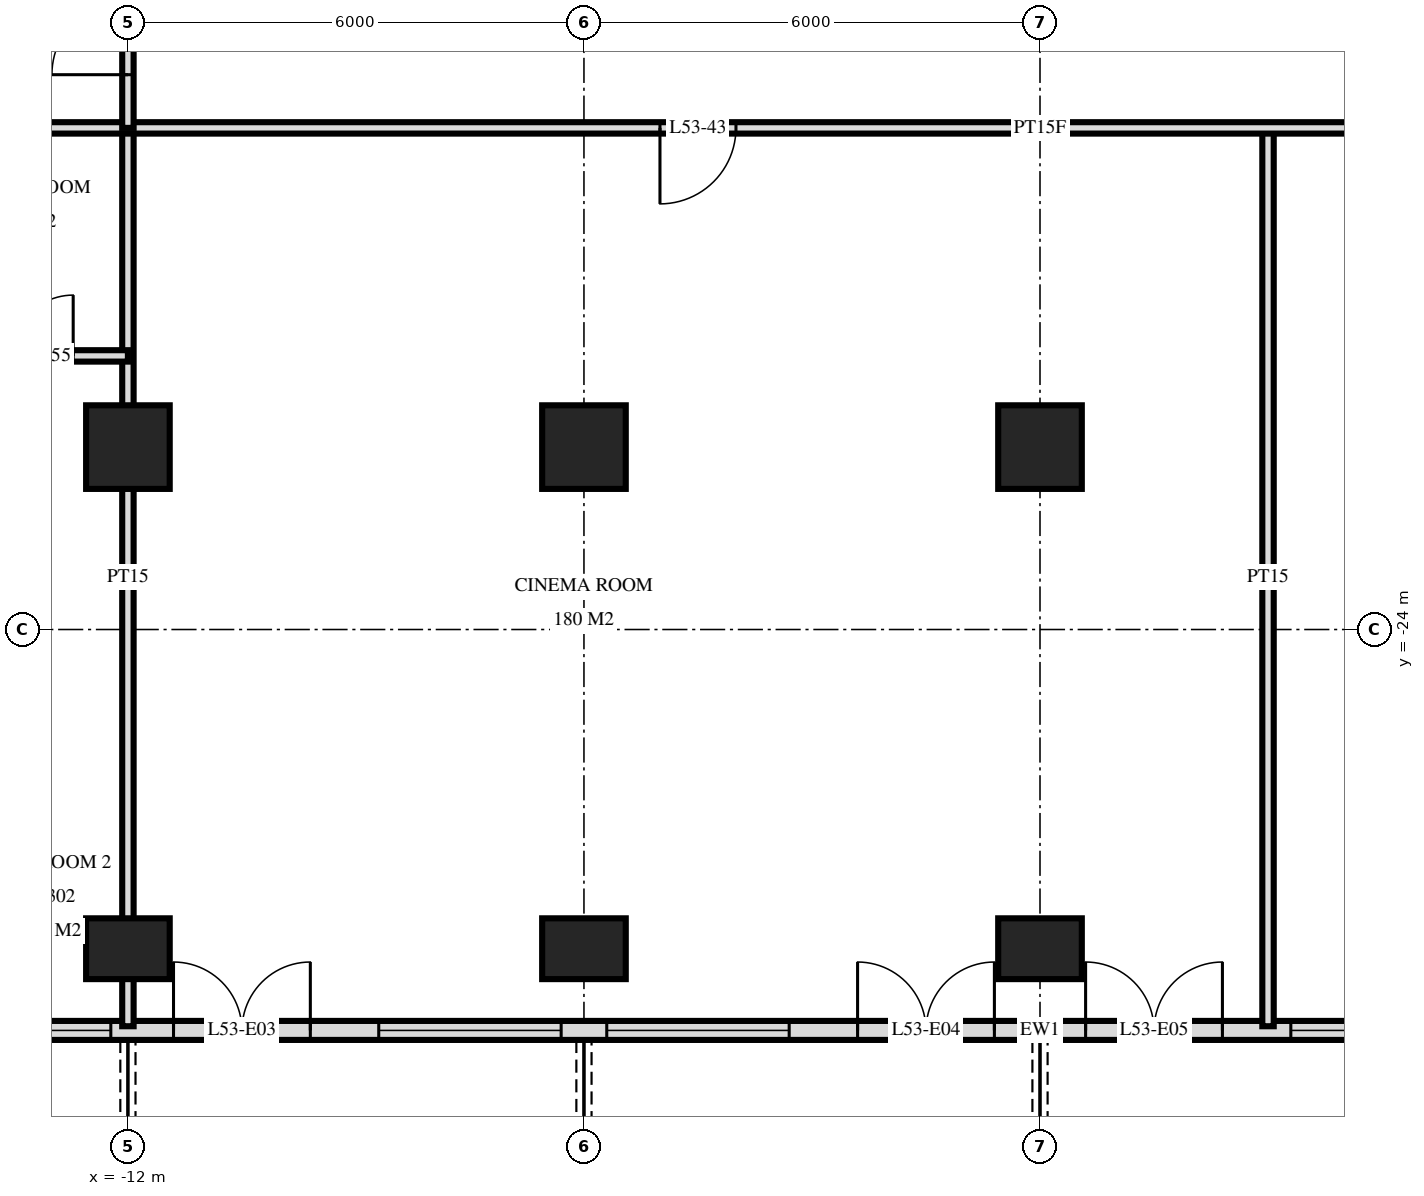
"""IFC4 building model, lengths in metres.
Left out: names, types, materials, properties, quantities, classifications, styles, units other than length and angle.
Written with IfcOpenShell. Run it as: python <this file> out.ifc"""

import sys

from ifc_helpers import new_model, si_unit, direction, frame, frame_2d, origin, origin_2d, place, context, subcontext, project, spatial, rectangle, extrude, element, fill, save


model = new_model("IFC4")
c1 = context("Model", 3, precision=1e-05, world=origin(), true_north=direction((0.0, 1.0)))
c2 = subcontext(c1, "Body", "Model", "MODEL_VIEW")
j1 = project(units=[si_unit("LENGTHUNIT", "METRE"), si_unit("PLANEANGLEUNIT", "RADIAN")], contexts=[c1])
p1 = place(None, origin())
s1 = spatial("IfcSite", under=j1, at=p1, CompositionType="ELEMENT")
p2 = place(p1, origin())
s2 = spatial("IfcBuilding", under=s1, at=p2, CompositionType="ELEMENT")
p3 = place(p2, frame((0.0, 0.0, 204.6)))
s3 = spatial("IfcBuildingStorey", under=s2, at=p3, CompositionType="ELEMENT", Elevation=204.6)
p4 = place(p3, frame((-12.0, -28.2, 0.0), z_axis=(0.0, 0.0, 1.0), x_axis=(1.0, 0.0, 0.0)))
e1 = element("IfcColumn", 1, at=p4, inside=s3, PredefinedType="COLUMN", context=c2, shape_type="SweptSolid", body=[
    extrude(rectangle(XDim=1.1, YDim=0.8, at=origin_2d()), origin(), (0.0, 0.0, 1.0), 3.5),
])
p5 = place(p3, frame((-12.0, -21.6, 0.0), z_axis=(0.0, 0.0, 1.0), x_axis=(1.0, 0.0, 0.0)))
e2 = element("IfcColumn", 2, at=p5, inside=s3, PredefinedType="COLUMN", context=c2, shape_type="SweptSolid", body=[
    extrude(rectangle(XDim=1.1, YDim=1.1, at=origin_2d()), origin(), (0.0, 0.0, 1.0), 3.5),
])
p6 = place(p3, frame((-6.0, -28.2, 0.0), z_axis=(0.0, 0.0, 1.0), x_axis=(1.0, 0.0, 0.0)))
e3 = element("IfcColumn", 3, at=p6, inside=s3, PredefinedType="COLUMN", context=c2, shape_type="SweptSolid", body=[
    extrude(rectangle(XDim=1.1, YDim=0.8, at=origin_2d()), origin(), (0.0, 0.0, 1.0), 3.5),
])
p7 = place(p3, frame((-6.0, -21.6, 0.0), z_axis=(0.0, 0.0, 1.0), x_axis=(1.0, 0.0, 0.0)))
e4 = element("IfcColumn", 4, at=p7, inside=s3, PredefinedType="COLUMN", context=c2, shape_type="SweptSolid", body=[
    extrude(rectangle(XDim=1.1, YDim=1.1, at=origin_2d()), origin(), (0.0, 0.0, 1.0), 3.5),
])
p8 = place(p3, frame((0.0, -28.2, 0.0), z_axis=(0.0, 0.0, 1.0), x_axis=(1.0, 0.0, 0.0)))
e5 = element("IfcColumn", 5, at=p8, inside=s3, PredefinedType="COLUMN", context=c2, shape_type="SweptSolid", body=[
    extrude(rectangle(XDim=1.1, YDim=0.8, at=origin_2d()), origin(), (0.0, 0.0, 1.0), 3.5),
])
p9 = place(p3, frame((0.0, -21.6, 0.0), z_axis=(0.0, 0.0, 1.0), x_axis=(1.0, 0.0, 0.0)))
e6 = element("IfcColumn", 6, at=p9, inside=s3, PredefinedType="COLUMN", context=c2, shape_type="SweptSolid", body=[
    extrude(rectangle(XDim=1.1, YDim=1.1, at=origin_2d()), origin(), (0.0, 0.0, 1.0), 3.5),
])
p10 = place(p3, frame((-22.475, -29.275, 0.0), z_axis=(0.0, 0.0, 1.0), x_axis=(1.0, 0.0, 0.0)))
e7 = element("IfcWall", 7, at=p10, inside=s3, PredefinedType="SOLIDWALL", context=c2, shape_type="SweptSolid", body=[
    extrude(rectangle(XDim=44.951, YDim=0.25, at=frame_2d((22.475, 0.0))), origin(), (0.0, 0.0, 1.0), 3.22),
])
p11 = place(p10, frame((0.575, 0.0, 0.0)))
e8 = element("IfcOpeningElement", 8, at=p11, cuts=e7, PredefinedType="OPENING", context=c2, shape_type="SweptSolid", body=[
    extrude(rectangle(XDim=1.8, YDim=2.4, at=frame_2d((0.9, 1.2))), frame((0.0, 0.135, 0.0), z_axis=(0.0, -1.0, 0.0), x_axis=(1.0, 0.0, 0.0)), (0.0, 0.0, 1.0), 0.27),
])
p12 = place(p10, frame((6.2, 0.0, 0.0)))
e9 = element("IfcOpeningElement", 9, at=p12, cuts=e7, PredefinedType="OPENING", context=c2, shape_type="SweptSolid", body=[
    extrude(rectangle(XDim=1.8, YDim=2.4, at=frame_2d((0.9, 1.2))), frame((0.0, 0.135, 0.0), z_axis=(0.0, -1.0, 0.0), x_axis=(1.0, 0.0, 0.0)), (0.0, 0.0, 1.0), 0.27),
])
p13 = place(p10, frame((8.45, 0.0, 0.9)))
e10 = element("IfcOpeningElement", 10, at=p13, cuts=e7, PredefinedType="OPENING", context=c2, shape_type="SweptSolid", body=[
    extrude(rectangle(XDim=1.8, YDim=1.5, at=frame_2d((0.9, 0.75))), frame((0.0, 0.135, 0.0), z_axis=(0.0, -1.0, 0.0), x_axis=(1.0, 0.0, 0.0)), (0.0, 0.0, 1.0), 0.27),
])
p14 = place(p10, frame((11.075, 0.0, 0.0)))
e11 = element("IfcOpeningElement", 11, at=p14, cuts=e7, PredefinedType="OPENING", context=c2, shape_type="SweptSolid", body=[
    extrude(rectangle(XDim=1.8, YDim=2.4, at=frame_2d((0.9, 1.2))), frame((0.0, 0.135, 0.0), z_axis=(0.0, -1.0, 0.0), x_axis=(1.0, 0.0, 0.0)), (0.0, 0.0, 1.0), 0.27),
])
p15 = place(p10, frame((13.775, 0.0, 0.9)))
e12 = element("IfcOpeningElement", 12, at=p15, cuts=e7, PredefinedType="OPENING", context=c2, shape_type="SweptSolid", body=[
    extrude(rectangle(XDim=2.4, YDim=1.5, at=frame_2d((1.2, 0.75))), frame((0.0, 0.135, 0.0), z_axis=(0.0, -1.0, 0.0), x_axis=(1.0, 0.0, 0.0)), (0.0, 0.0, 1.0), 0.27),
])
p16 = place(p10, frame((16.775, 0.0, 0.9)))
e13 = element("IfcOpeningElement", 13, at=p16, cuts=e7, PredefinedType="OPENING", context=c2, shape_type="SweptSolid", body=[
    extrude(rectangle(XDim=2.4, YDim=1.5, at=frame_2d((1.2, 0.75))), frame((0.0, 0.135, 0.0), z_axis=(0.0, -1.0, 0.0), x_axis=(1.0, 0.0, 0.0)), (0.0, 0.0, 1.0), 0.27),
])
p17 = place(p10, frame((20.075, 0.0, 0.0)))
e14 = element("IfcOpeningElement", 14, at=p17, cuts=e7, PredefinedType="OPENING", context=c2, shape_type="SweptSolid", body=[
    extrude(rectangle(XDim=1.8, YDim=2.4, at=frame_2d((0.9, 1.2))), frame((0.0, 0.135, 0.0), z_axis=(0.0, -1.0, 0.0), x_axis=(1.0, 0.0, 0.0)), (0.0, 0.0, 1.0), 0.27),
])
p18 = place(p10, frame((23.075, 0.0, 0.0)))
e15 = element("IfcOpeningElement", 15, at=p18, cuts=e7, PredefinedType="OPENING", context=c2, shape_type="SweptSolid", body=[
    extrude(rectangle(XDim=1.8, YDim=2.4, at=frame_2d((0.9, 1.2))), frame((0.0, 0.135, 0.0), z_axis=(0.0, -1.0, 0.0), x_axis=(1.0, 0.0, 0.0)), (0.0, 0.0, 1.0), 0.27),
])
p19 = place(p10, frame((25.775, 0.0, 0.9)))
e16 = element("IfcOpeningElement", 16, at=p19, cuts=e7, PredefinedType="OPENING", context=c2, shape_type="SweptSolid", body=[
    extrude(rectangle(XDim=2.4, YDim=1.5, at=frame_2d((1.2, 0.75))), frame((0.0, 0.135, 0.0), z_axis=(0.0, -1.0, 0.0), x_axis=(1.0, 0.0, 0.0)), (0.0, 0.0, 1.0), 0.27),
])
p20 = place(p10, frame((29.075, 0.0, 0.0)))
e17 = element("IfcOpeningElement", 17, at=p20, cuts=e7, PredefinedType="OPENING", context=c2, shape_type="SweptSolid", body=[
    extrude(rectangle(XDim=1.8, YDim=2.4, at=frame_2d((0.9, 1.2))), frame((0.0, 0.135, 0.0), z_axis=(0.0, -1.0, 0.0), x_axis=(1.0, 0.0, 0.0)), (0.0, 0.0, 1.0), 0.27),
])
p21 = place(p10, frame((31.775, 0.0, 0.9)))
e18 = element("IfcOpeningElement", 18, at=p21, cuts=e7, PredefinedType="OPENING", context=c2, shape_type="SweptSolid", body=[
    extrude(rectangle(XDim=2.4, YDim=1.5, at=frame_2d((1.2, 0.75))), frame((0.0, 0.135, 0.0), z_axis=(0.0, -1.0, 0.0), x_axis=(1.0, 0.0, 0.0)), (0.0, 0.0, 1.0), 0.27),
])
p22 = place(p10, frame((34.775, 0.0, 0.9)))
e19 = element("IfcOpeningElement", 19, at=p22, cuts=e7, PredefinedType="OPENING", context=c2, shape_type="SweptSolid", body=[
    extrude(rectangle(XDim=2.4, YDim=1.5, at=frame_2d((1.2, 0.75))), frame((0.0, 0.135, 0.0), z_axis=(0.0, -1.0, 0.0), x_axis=(1.0, 0.0, 0.0)), (0.0, 0.0, 1.0), 0.27),
])
p23 = place(p10, frame((38.075, 0.0, 0.0)))
e20 = element("IfcOpeningElement", 20, at=p23, cuts=e7, PredefinedType="OPENING", context=c2, shape_type="SweptSolid", body=[
    extrude(rectangle(XDim=1.8, YDim=2.4, at=frame_2d((0.9, 1.2))), frame((0.0, 0.135, 0.0), z_axis=(0.0, -1.0, 0.0), x_axis=(1.0, 0.0, 0.0)), (0.0, 0.0, 1.0), 0.27),
])
p24 = place(p10, frame((41.075, 0.0, 0.0)))
e21 = element("IfcOpeningElement", 21, at=p24, cuts=e7, PredefinedType="OPENING", context=c2, shape_type="SweptSolid", body=[
    extrude(rectangle(XDim=1.8, YDim=2.4, at=frame_2d((0.9, 1.2))), frame((0.0, 0.135, 0.0), z_axis=(0.0, -1.0, 0.0), x_axis=(1.0, 0.0, 0.0)), (0.0, 0.0, 1.0), 0.27),
])
p25 = place(p3, frame((3.0, -29.22, 0.0), z_axis=(0.0, 0.0, 1.0), x_axis=(0.0, 1.0, 0.0)))
e22 = element("IfcWall", 22, at=p25, inside=s3, PredefinedType="PARTITIONING", context=c2, shape_type="SweptSolid", body=[
    extrude(rectangle(XDim=11.82, YDim=0.15, at=frame_2d((5.91, 0.0))), origin(), (0.0, 0.0, 1.0), 3.22),
])
p26 = place(p3, frame((-12.0, -17.4, 0.0), z_axis=(0.0, 0.0, 1.0), x_axis=(0.0, 1.0, 0.0)))
e23 = element("IfcWall", 23, at=p26, inside=s3, PredefinedType="PARTITIONING", context=c2, shape_type="SweptSolid", body=[
    extrude(rectangle(XDim=2.35, YDim=0.15, at=frame_2d((1.175, 0.0))), origin(), (0.0, 0.0, 1.0), 3.22),
])
p27 = place(p26, frame((0.7, 0.0, 0.0)))
e24 = element("IfcOpeningElement", 24, at=p27, cuts=e23, PredefinedType="OPENING", context=c2, shape_type="SweptSolid", body=[
    extrude(rectangle(XDim=1.0, YDim=2.1, at=frame_2d((0.5, 1.05))), frame((0.0, 0.085, 0.0), z_axis=(0.0, -1.0, 0.0), x_axis=(1.0, 0.0, 0.0)), (0.0, 0.0, 1.0), 0.17),
])
p28 = place(p3, frame((-12.0, -29.22, 0.0), z_axis=(0.0, 0.0, 1.0), x_axis=(0.0, 1.0, 0.0)))
e25 = element("IfcWall", 25, at=p28, inside=s3, PredefinedType="PARTITIONING", context=c2, shape_type="SweptSolid", body=[
    extrude(rectangle(XDim=11.82, YDim=0.15, at=frame_2d((5.91, 0.0))), origin(), (0.0, 0.0, 1.0), 3.22),
])
p29 = place(p3, frame((-14.25, -20.4, 0.0), z_axis=(0.0, 0.0, 1.0), x_axis=(1.0, 0.0, 0.0)))
e26 = element("IfcWall", 26, at=p29, inside=s3, PredefinedType="PARTITIONING", context=c2, shape_type="SweptSolid", body=[
    extrude(rectangle(XDim=2.25, YDim=0.15, at=frame_2d((1.125, 0.0))), origin(), (0.0, 0.0, 1.0), 3.22),
])
p30 = place(p29, frame((0.73, 0.0, 0.0)))
e27 = element("IfcOpeningElement", 27, at=p30, cuts=e26, PredefinedType="OPENING", context=c2, shape_type="SweptSolid", body=[
    extrude(rectangle(XDim=0.8, YDim=2.1, at=frame_2d((0.4, 1.05))), frame((0.0, 0.085, 0.0), z_axis=(0.0, -1.0, 0.0), x_axis=(1.0, 0.0, 0.0)), (0.0, 0.0, 1.0), 0.17),
])
p31 = place(p3, frame((-26.82, -17.4, 0.0), z_axis=(0.0, 0.0, 1.0), x_axis=(1.0, 0.0, 0.0)))
e28 = element("IfcWall", 28, at=p31, inside=s3, PredefinedType="PARTITIONING", context=c2, shape_type="SweptSolid", body=[
    extrude(rectangle(XDim=53.64, YDim=0.15, at=frame_2d((26.82, 0.0))), origin(), (0.0, 0.0, 1.0), 3.22),
])
p32 = place(p31, frame((4.92, 0.0, 0.0)))
e29 = element("IfcOpeningElement", 29, at=p32, cuts=e28, PredefinedType="OPENING", context=c2, shape_type="SweptSolid", body=[
    extrude(rectangle(XDim=1.0, YDim=2.1, at=frame_2d((0.5, 1.05))), frame((0.0, 0.085, 0.0), z_axis=(0.0, -1.0, 0.0), x_axis=(1.0, 0.0, 0.0)), (0.0, 0.0, 1.0), 0.17),
])
p33 = place(p31, frame((1.62, 0.0, 0.0)))
e30 = element("IfcOpeningElement", 30, at=p33, cuts=e28, PredefinedType="OPENING", context=c2, shape_type="SweptSolid", body=[
    extrude(rectangle(XDim=1.0, YDim=2.1, at=frame_2d((0.5, 1.05))), frame((0.0, 0.085, 0.0), z_axis=(0.0, -1.0, 0.0), x_axis=(1.0, 0.0, 0.0)), (0.0, 0.0, 1.0), 0.17),
])
p34 = place(p31, frame((41.17, 0.0, 0.0)))
e31 = element("IfcOpeningElement", 31, at=p34, cuts=e28, PredefinedType="OPENING", context=c2, shape_type="SweptSolid", body=[
    extrude(rectangle(XDim=1.0, YDim=2.1, at=frame_2d((0.5, 1.05))), frame((0.0, 0.085, 0.0), z_axis=(0.0, -1.0, 0.0), x_axis=(1.0, 0.0, 0.0)), (0.0, 0.0, 1.0), 0.17),
])
p35 = place(p31, frame((49.42, 0.0, 0.0)))
e32 = element("IfcOpeningElement", 32, at=p35, cuts=e28, PredefinedType="OPENING", context=c2, shape_type="SweptSolid", body=[
    extrude(rectangle(XDim=1.0, YDim=2.1, at=frame_2d((0.5, 1.05))), frame((0.0, 0.085, 0.0), z_axis=(0.0, -1.0, 0.0), x_axis=(1.0, 0.0, 0.0)), (0.0, 0.0, 1.0), 0.17),
])
p36 = place(p31, frame((47.62, 0.0, 0.0)))
e33 = element("IfcOpeningElement", 33, at=p36, cuts=e28, PredefinedType="OPENING", context=c2, shape_type="SweptSolid", body=[
    extrude(rectangle(XDim=1.0, YDim=2.1, at=frame_2d((0.5, 1.05))), frame((0.0, 0.085, 0.0), z_axis=(0.0, -1.0, 0.0), x_axis=(1.0, 0.0, 0.0)), (0.0, 0.0, 1.0), 0.17),
])
p37 = place(p31, frame((21.82, 0.0, 0.0)))
e34 = element("IfcOpeningElement", 34, at=p37, cuts=e28, PredefinedType="OPENING", context=c2, shape_type="SweptSolid", body=[
    extrude(rectangle(XDim=1.0, YDim=2.1, at=frame_2d((0.5, 1.05))), frame((0.0, 0.085, 0.0), z_axis=(0.0, -1.0, 0.0), x_axis=(1.0, 0.0, 0.0)), (0.0, 0.0, 1.0), 0.17),
])
p38 = place(p31, frame((33.82, 0.0, 0.0)))
e35 = element("IfcOpeningElement", 35, at=p38, cuts=e28, PredefinedType="OPENING", context=c2, shape_type="SweptSolid", body=[
    extrude(rectangle(XDim=1.0, YDim=2.1, at=frame_2d((0.5, 1.05))), frame((0.0, 0.085, 0.0), z_axis=(0.0, -1.0, 0.0), x_axis=(1.0, 0.0, 0.0)), (0.0, 0.0, 1.0), 0.17),
])
p39 = place(p13, origin())
e36 = element("IfcWindow", 36, at=p39, inside=s3, PartitioningType="SINGLE_PANEL", PredefinedType="WINDOW", context=c2, shape_type="SweptSolid", body=[
    extrude(rectangle(XDim=1.8, YDim=1.5, at=frame_2d((0.9, 0.75))), frame((0.0, 0.03, 0.0), z_axis=(0.0, -1.0, 0.0), x_axis=(1.0, 0.0, 0.0)), (0.0, 0.0, 1.0), 0.06),
])
fill(e10, e36)
p40 = place(p14, origin())
e37 = element("IfcDoor", 37, at=p40, inside=s3, OperationType="DOUBLE_DOOR_SINGLE_SWING", PredefinedType="DOOR", context=c2, shape_type="SweptSolid", body=[
    extrude(rectangle(XDim=1.8, YDim=2.4, at=frame_2d((0.9, 1.2))), frame((0.0, 0.025, 0.0), z_axis=(0.0, -1.0, 0.0), x_axis=(1.0, 0.0, 0.0)), (0.0, 0.0, 1.0), 0.05),
])
fill(e11, e37)
p41 = place(p15, origin())
e38 = element("IfcWindow", 38, at=p41, inside=s3, PartitioningType="SINGLE_PANEL", PredefinedType="WINDOW", context=c2, shape_type="SweptSolid", body=[
    extrude(rectangle(XDim=2.4, YDim=1.5, at=frame_2d((1.2, 0.75))), frame((0.0, 0.03, 0.0), z_axis=(0.0, -1.0, 0.0), x_axis=(1.0, 0.0, 0.0)), (0.0, 0.0, 1.0), 0.06),
])
fill(e12, e38)
p42 = place(p16, origin())
e39 = element("IfcWindow", 39, at=p42, inside=s3, PartitioningType="SINGLE_PANEL", PredefinedType="WINDOW", context=c2, shape_type="SweptSolid", body=[
    extrude(rectangle(XDim=2.4, YDim=1.5, at=frame_2d((1.2, 0.75))), frame((0.0, 0.03, 0.0), z_axis=(0.0, -1.0, 0.0), x_axis=(1.0, 0.0, 0.0)), (0.0, 0.0, 1.0), 0.06),
])
fill(e13, e39)
p43 = place(p17, origin())
e40 = element("IfcDoor", 40, at=p43, inside=s3, OperationType="DOUBLE_DOOR_SINGLE_SWING", PredefinedType="DOOR", context=c2, shape_type="SweptSolid", body=[
    extrude(rectangle(XDim=1.8, YDim=2.4, at=frame_2d((0.9, 1.2))), frame((0.0, 0.025, 0.0), z_axis=(0.0, -1.0, 0.0), x_axis=(1.0, 0.0, 0.0)), (0.0, 0.0, 1.0), 0.05),
])
fill(e14, e40)
p44 = place(p18, origin())
e41 = element("IfcDoor", 41, at=p44, inside=s3, OperationType="DOUBLE_DOOR_SINGLE_SWING", PredefinedType="DOOR", context=c2, shape_type="SweptSolid", body=[
    extrude(rectangle(XDim=1.8, YDim=2.4, at=frame_2d((0.9, 1.2))), frame((0.0, 0.025, 0.0), z_axis=(0.0, -1.0, 0.0), x_axis=(1.0, 0.0, 0.0)), (0.0, 0.0, 1.0), 0.05),
])
fill(e15, e41)
p45 = place(p19, origin())
e42 = element("IfcWindow", 42, at=p45, inside=s3, PartitioningType="SINGLE_PANEL", PredefinedType="WINDOW", context=c2, shape_type="SweptSolid", body=[
    extrude(rectangle(XDim=2.4, YDim=1.5, at=frame_2d((1.2, 0.75))), frame((0.0, 0.03, 0.0), z_axis=(0.0, -1.0, 0.0), x_axis=(1.0, 0.0, 0.0)), (0.0, 0.0, 1.0), 0.06),
])
fill(e16, e42)
p46 = place(p27, origin())
e43 = element("IfcDoor", 43, at=p46, inside=s3, OperationType="SINGLE_SWING_RIGHT", PredefinedType="DOOR", context=c2, shape_type="SweptSolid", body=[
    extrude(rectangle(XDim=1.0, YDim=2.1, at=frame_2d((0.5, 1.05))), frame((0.0, 0.025, 0.0), z_axis=(0.0, -1.0, 0.0), x_axis=(1.0, 0.0, 0.0)), (0.0, 0.0, 1.0), 0.05),
])
fill(e24, e43)
p47 = place(p37, frame((0.5, 0.0, 0.0), z_axis=(0.0, 0.0, 1.0), x_axis=(-1.0, 0.0, 0.0)))
e44 = element("IfcDoor", 44, at=p47, inside=s3, OperationType="SINGLE_SWING_LEFT", PredefinedType="DOOR", context=c2, shape_type="SweptSolid", body=[
    extrude(rectangle(XDim=1.0, YDim=2.1, at=frame_2d((0.0, 1.05))), frame((0.0, -0.025, 0.0), z_axis=(0.0, 1.0, 0.0), x_axis=(-1.0, 0.0, 0.0)), (0.0, 0.0, 1.0), 0.05),
])
fill(e34, e44)
p48 = place(p30, origin())
e45 = element("IfcDoor", 45, at=p48, inside=s3, OperationType="SINGLE_SWING_LEFT", PredefinedType="DOOR", context=c2, shape_type="SweptSolid", body=[
    extrude(rectangle(XDim=0.8, YDim=2.1, at=frame_2d((0.4, 1.05))), frame((0.0, 0.025, 0.0), z_axis=(0.0, -1.0, 0.0), x_axis=(1.0, 0.0, 0.0)), (0.0, 0.0, 1.0), 0.05),
])
fill(e27, e45)
save(model, sys.argv[1])
